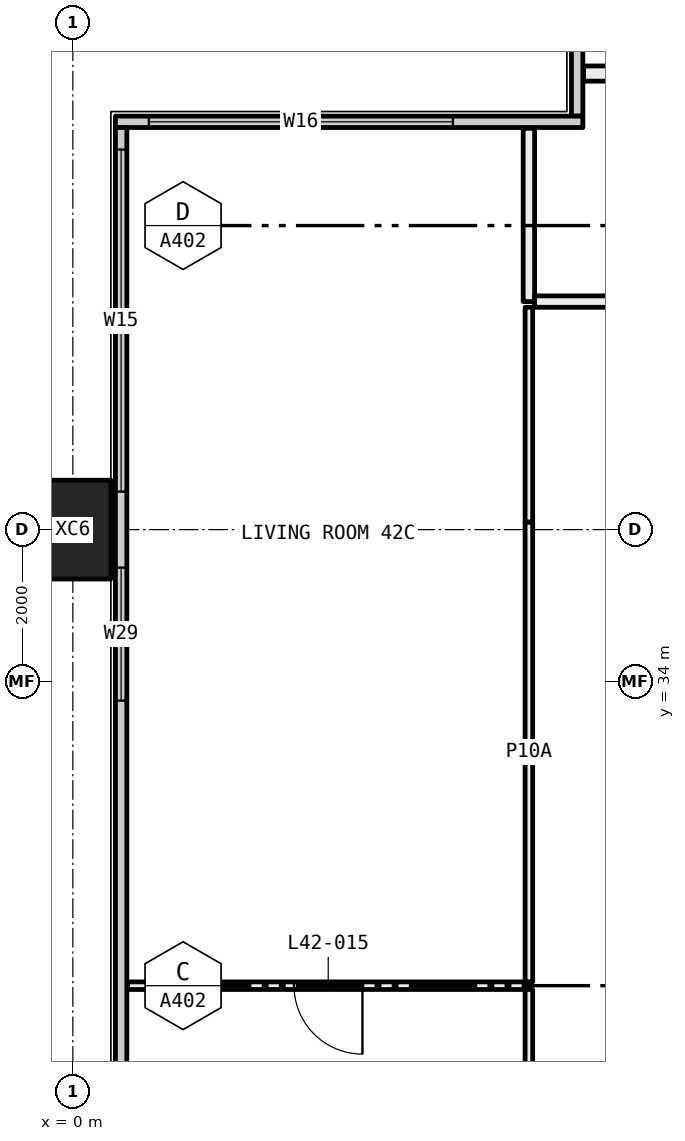
"""IFC4 building model, lengths in metres.
Left out: names, types, materials, properties, quantities, classifications, styles, units other than length and angle.
Written with IfcOpenShell. Run it as: python <this file> out.ifc"""

import sys

from ifc_helpers import new_model, si_unit, direction, frame, frame_2d, origin, origin_2d, place, context, subcontext, project, spatial, rectangle, hollow_rectangle, extrude, element, fill, save


model = new_model("IFC4")
c1 = context("Model", 3, precision=1e-05, world=origin(), true_north=direction((0.0, 1.0)))
c2 = subcontext(c1, "Body", "Model", "MODEL_VIEW")
j1 = project(units=[si_unit("LENGTHUNIT", "METRE"), si_unit("PLANEANGLEUNIT", "RADIAN")], contexts=[c1])
p1 = place(None, origin())
s1 = spatial("IfcSite", under=j1, at=p1, CompositionType="ELEMENT")
p2 = place(p1, origin())
s2 = spatial("IfcBuilding", under=s1, at=p2, CompositionType="ELEMENT")
p3 = place(p2, frame((0.0, 0.0, 161.7)))
s3 = spatial("IfcBuildingStorey", under=s2, at=p3, CompositionType="ELEMENT", Elevation=161.7)
p4 = place(p3, frame((0.0, 36.0, -0.4), z_axis=(0.0, 0.0, 1.0), x_axis=(0.0, 1.0, 0.0)))
e1 = element("IfcColumn", 1, at=p4, inside=s3, PredefinedType="COLUMN", context=c2, shape_type="SweptSolid", body=[
    extrude(hollow_rectangle(XDim=1.3, YDim=1.0, WallThickness=0.05, at=origin_2d()), origin(), (0.0, 0.0, 1.0), 3.45),
])
p5 = place(p3, frame((6.635, 41.44, 0.0), z_axis=(0.0, 0.0, 1.0), x_axis=(0.0, 1.0, 0.0)))
e2 = element("IfcWall", 2, at=p5, inside=s3, PredefinedType="ELEMENTEDWALL", context=c2, shape_type="SweptSolid", body=[
    extrude(rectangle(XDim=5.85, YDim=0.15, at=frame_2d((2.925, 0.0))), origin(), (0.0, 0.0, 1.0), 3.05),
])
p6 = place(p5, frame((1.56, 0.0, 0.45)))
e3 = element("IfcOpeningElement", 3, at=p6, cuts=e2, PredefinedType="OPENING", context=c2, shape_type="SweptSolid", body=[
    extrude(rectangle(XDim=4.0, YDim=2.55, at=frame_2d((2.0, 1.275))), frame((0.0, 0.085, 0.0), z_axis=(0.0, -1.0, 0.0), x_axis=(1.0, 0.0, 0.0)), (0.0, 0.0, 1.0), 0.17),
])
p7 = place(p3, frame((0.56, 41.365, 0.0), z_axis=(0.0, 0.0, 1.0), x_axis=(1.0, 0.0, 0.0)))
e4 = element("IfcWall", 4, at=p7, inside=s3, PredefinedType="ELEMENTEDWALL", context=c2, shape_type="SweptSolid", body=[
    extrude(rectangle(XDim=6.15, YDim=0.15, at=frame_2d((3.075, 0.0))), origin(), (0.0, 0.0, 1.0), 3.05),
])
p8 = place(p7, frame((0.44, 0.0, 0.45)))
e5 = element("IfcOpeningElement", 5, at=p8, cuts=e4, PredefinedType="OPENING", context=c2, shape_type="SweptSolid", body=[
    extrude(rectangle(XDim=4.0, YDim=2.55, at=frame_2d((2.0, 1.275))), frame((0.0, 0.085, 0.0), z_axis=(0.0, -1.0, 0.0), x_axis=(1.0, 0.0, 0.0)), (0.0, 0.0, 1.0), 0.17),
])
p9 = place(p3, frame((0.635, 18.71, 0.0), z_axis=(0.0, 0.0, 1.0), x_axis=(0.0, 1.0, 0.0)))
e6 = element("IfcWall", 6, at=p9, inside=s3, PredefinedType="ELEMENTEDWALL", context=c2, shape_type="SweptSolid", body=[
    extrude(rectangle(XDim=22.58, YDim=0.15, at=frame_2d((11.29, 0.0))), origin(), (0.0, 0.0, 1.0), 3.05),
])
p10 = place(p9, frame((0.29, 0.0, 0.45)))
e7 = element("IfcOpeningElement", 7, at=p10, cuts=e6, PredefinedType="OPENING", context=c2, shape_type="SweptSolid", body=[
    extrude(rectangle(XDim=4.5, YDim=2.55, at=frame_2d((2.25, 1.275))), frame((0.0, 0.085, 0.0), z_axis=(0.0, -1.0, 0.0), x_axis=(1.0, 0.0, 0.0)), (0.0, 0.0, 1.0), 0.17),
])
p11 = place(p9, frame((5.79, 0.0, 0.45)))
e8 = element("IfcOpeningElement", 8, at=p11, cuts=e6, PredefinedType="OPENING", context=c2, shape_type="SweptSolid", body=[
    extrude(rectangle(XDim=1.75, YDim=2.55, at=frame_2d((0.875, 1.275))), frame((0.0, 0.085, 0.0), z_axis=(0.0, -1.0, 0.0), x_axis=(1.0, 0.0, 0.0)), (0.0, 0.0, 1.0), 0.17),
])
p12 = place(p9, frame((15.04, 0.0, 0.45)))
e9 = element("IfcOpeningElement", 9, at=p12, cuts=e6, PredefinedType="OPENING", context=c2, shape_type="SweptSolid", body=[
    extrude(rectangle(XDim=1.75, YDim=2.55, at=frame_2d((0.875, 1.275))), frame((0.0, 0.085, 0.0), z_axis=(0.0, -1.0, 0.0), x_axis=(1.0, 0.0, 0.0)), (0.0, 0.0, 1.0), 0.17),
])
p13 = place(p9, frame((17.79, 0.0, 0.45)))
e10 = element("IfcOpeningElement", 10, at=p13, cuts=e6, PredefinedType="OPENING", context=c2, shape_type="SweptSolid", body=[
    extrude(rectangle(XDim=4.5, YDim=2.55, at=frame_2d((2.25, 1.275))), frame((0.0, 0.085, 0.0), z_axis=(0.0, -1.0, 0.0), x_axis=(1.0, 0.0, 0.0)), (0.0, 0.0, 1.0), 0.17),
])
p14 = place(p3, frame((6.72, 42.0, 0.0), z_axis=(0.0, 0.0, 1.0), x_axis=(1.0, 0.0, 0.0)))
e11 = element("IfcWall", 11, at=p14, inside=s3, PredefinedType="PARTITIONING", context=c2, shape_type="SweptSolid", body=[
    extrude(rectangle(XDim=3.38, YDim=0.2, at=frame_2d((1.69, 0.0))), origin(), (0.0, 0.0, 1.0), 3.05),
])
p15 = place(p3, frame((6.0, 30.0, 0.0), z_axis=(0.0, 0.0, 1.0), x_axis=(-1.0, 0.0, 0.0)))
e12 = element("IfcWall", 12, at=p15, inside=s3, PredefinedType="PARTITIONING", context=c2, shape_type="SweptSolid", body=[
    extrude(rectangle(XDim=5.28, YDim=0.1, at=frame_2d((2.64, 0.0))), origin(), (0.0, 0.0, 1.0), 3.05),
])
p16 = place(p15, frame((2.19, 0.0, 0.0)))
e13 = element("IfcOpeningElement", 13, at=p16, cuts=e12, PredefinedType="OPENING", context=c2, shape_type="SweptSolid", body=[
    extrude(rectangle(XDim=0.9, YDim=2.1, at=frame_2d((0.45, 1.05))), frame((0.0, 0.06, 0.0), z_axis=(0.0, -1.0, 0.0), x_axis=(1.0, 0.0, 0.0)), (0.0, 0.0, 1.0), 0.12),
])
p17 = place(p3, frame((6.0, 25.5, 0.0), z_axis=(0.0, 0.0, 1.0), x_axis=(0.0, 1.0, 0.0)))
e14 = element("IfcWall", 14, at=p17, inside=s3, PredefinedType="PARTITIONING", context=c2, shape_type="SweptSolid", body=[
    extrude(rectangle(XDim=4.45, YDim=0.1, at=frame_2d((2.225, 0.0))), origin(), (0.0, 0.0, 1.0), 3.05),
])
p18 = place(p3, frame((6.0, 30.05, 0.0), z_axis=(0.0, 0.0, 1.0), x_axis=(0.0, 1.0, 0.0)))
e15 = element("IfcWall", 15, at=p18, inside=s3, PredefinedType="PARTITIONING", context=c2, shape_type="SweptSolid", body=[
    extrude(rectangle(XDim=6.05, YDim=0.1, at=frame_2d((3.025, 0.0))), origin(), (0.0, 0.0, 1.0), 2.45),
])
p19 = place(p3, frame((6.0, 36.1, 0.0), z_axis=(0.0, 0.0, 1.0), x_axis=(0.0, 1.0, 0.0)))
e16 = element("IfcWall", 16, at=p19, inside=s3, PredefinedType="PARTITIONING", context=c2, shape_type="SweptSolid", body=[
    extrude(rectangle(XDim=2.825, YDim=0.1, at=frame_2d((1.413, 0.0))), origin(), (0.0, 0.0, 1.0), 3.05),
])
p20 = place(p3, frame((6.0, 39.0, 0.0), z_axis=(0.0, 0.0, 1.0), x_axis=(0.0, 1.0, 0.0)))
e17 = element("IfcWall", 17, at=p20, inside=s3, PredefinedType="PARTITIONING", context=c2, shape_type="SweptSolid", body=[
    extrude(rectangle(XDim=2.28, YDim=0.15, at=frame_2d((1.14, 0.0))), origin(), (0.0, 0.0, 1.0), 3.05),
])
p21 = place(p3, frame((10.0, 39.0, 0.0), z_axis=(0.0, 0.0, 1.0), x_axis=(-1.0, 0.0, 0.0)))
e18 = element("IfcWall", 18, at=p21, inside=s3, PredefinedType="PARTITIONING", context=c2, shape_type="SweptSolid", body=[
    extrude(rectangle(XDim=3.925, YDim=0.15, at=frame_2d((1.962, 0.0))), origin(), (0.0, 0.0, 1.0), 3.05),
])
p22 = place(p21, frame((1.512, 0.0, 0.0)))
e19 = element("IfcOpeningElement", 19, at=p22, cuts=e18, PredefinedType="OPENING", context=c2, shape_type="SweptSolid", body=[
    extrude(rectangle(XDim=0.9, YDim=2.1, at=frame_2d((0.45, 1.05))), frame((0.0, 0.085, 0.0), z_axis=(0.0, -1.0, 0.0), x_axis=(1.0, 0.0, 0.0)), (0.0, 0.0, 1.0), 0.17),
])
p23 = place(p8, origin())
e20 = element("IfcWindow", 20, at=p23, inside=s3, PartitioningType="SINGLE_PANEL", PredefinedType="WINDOW", context=c2, shape_type="SweptSolid", body=[
    extrude(rectangle(XDim=4.0, YDim=2.55, at=frame_2d((2.0, 1.275))), frame((0.0, 0.03, 0.0), z_axis=(0.0, -1.0, 0.0), x_axis=(1.0, 0.0, 0.0)), (0.0, 0.0, 1.0), 0.06),
])
fill(e5, e20)
p24 = place(p12, origin())
e21 = element("IfcWindow", 21, at=p24, inside=s3, PartitioningType="SINGLE_PANEL", PredefinedType="WINDOW", context=c2, shape_type="SweptSolid", body=[
    extrude(rectangle(XDim=1.75, YDim=2.55, at=frame_2d((0.875, 1.275))), frame((0.0, 0.03, 0.0), z_axis=(0.0, -1.0, 0.0), x_axis=(1.0, 0.0, 0.0)), (0.0, 0.0, 1.0), 0.06),
])
fill(e9, e21)
p25 = place(p13, origin())
e22 = element("IfcWindow", 22, at=p25, inside=s3, PartitioningType="SINGLE_PANEL", PredefinedType="WINDOW", context=c2, shape_type="SweptSolid", body=[
    extrude(rectangle(XDim=4.5, YDim=2.55, at=frame_2d((2.25, 1.275))), frame((0.0, 0.03, 0.0), z_axis=(0.0, -1.0, 0.0), x_axis=(1.0, 0.0, 0.0)), (0.0, 0.0, 1.0), 0.06),
])
fill(e10, e22)
p26 = place(p16, origin())
e23 = element("IfcDoor", 23, at=p26, inside=s3, OperationType="SINGLE_SWING_RIGHT", PredefinedType="DOOR", context=c2, shape_type="SweptSolid", body=[
    extrude(rectangle(XDim=0.9, YDim=2.1, at=frame_2d((0.45, 1.05))), frame((0.0, 0.025, 0.0), z_axis=(0.0, -1.0, 0.0), x_axis=(1.0, 0.0, 0.0)), (0.0, 0.0, 1.0), 0.05),
])
fill(e13, e23)
save(model, sys.argv[1])
